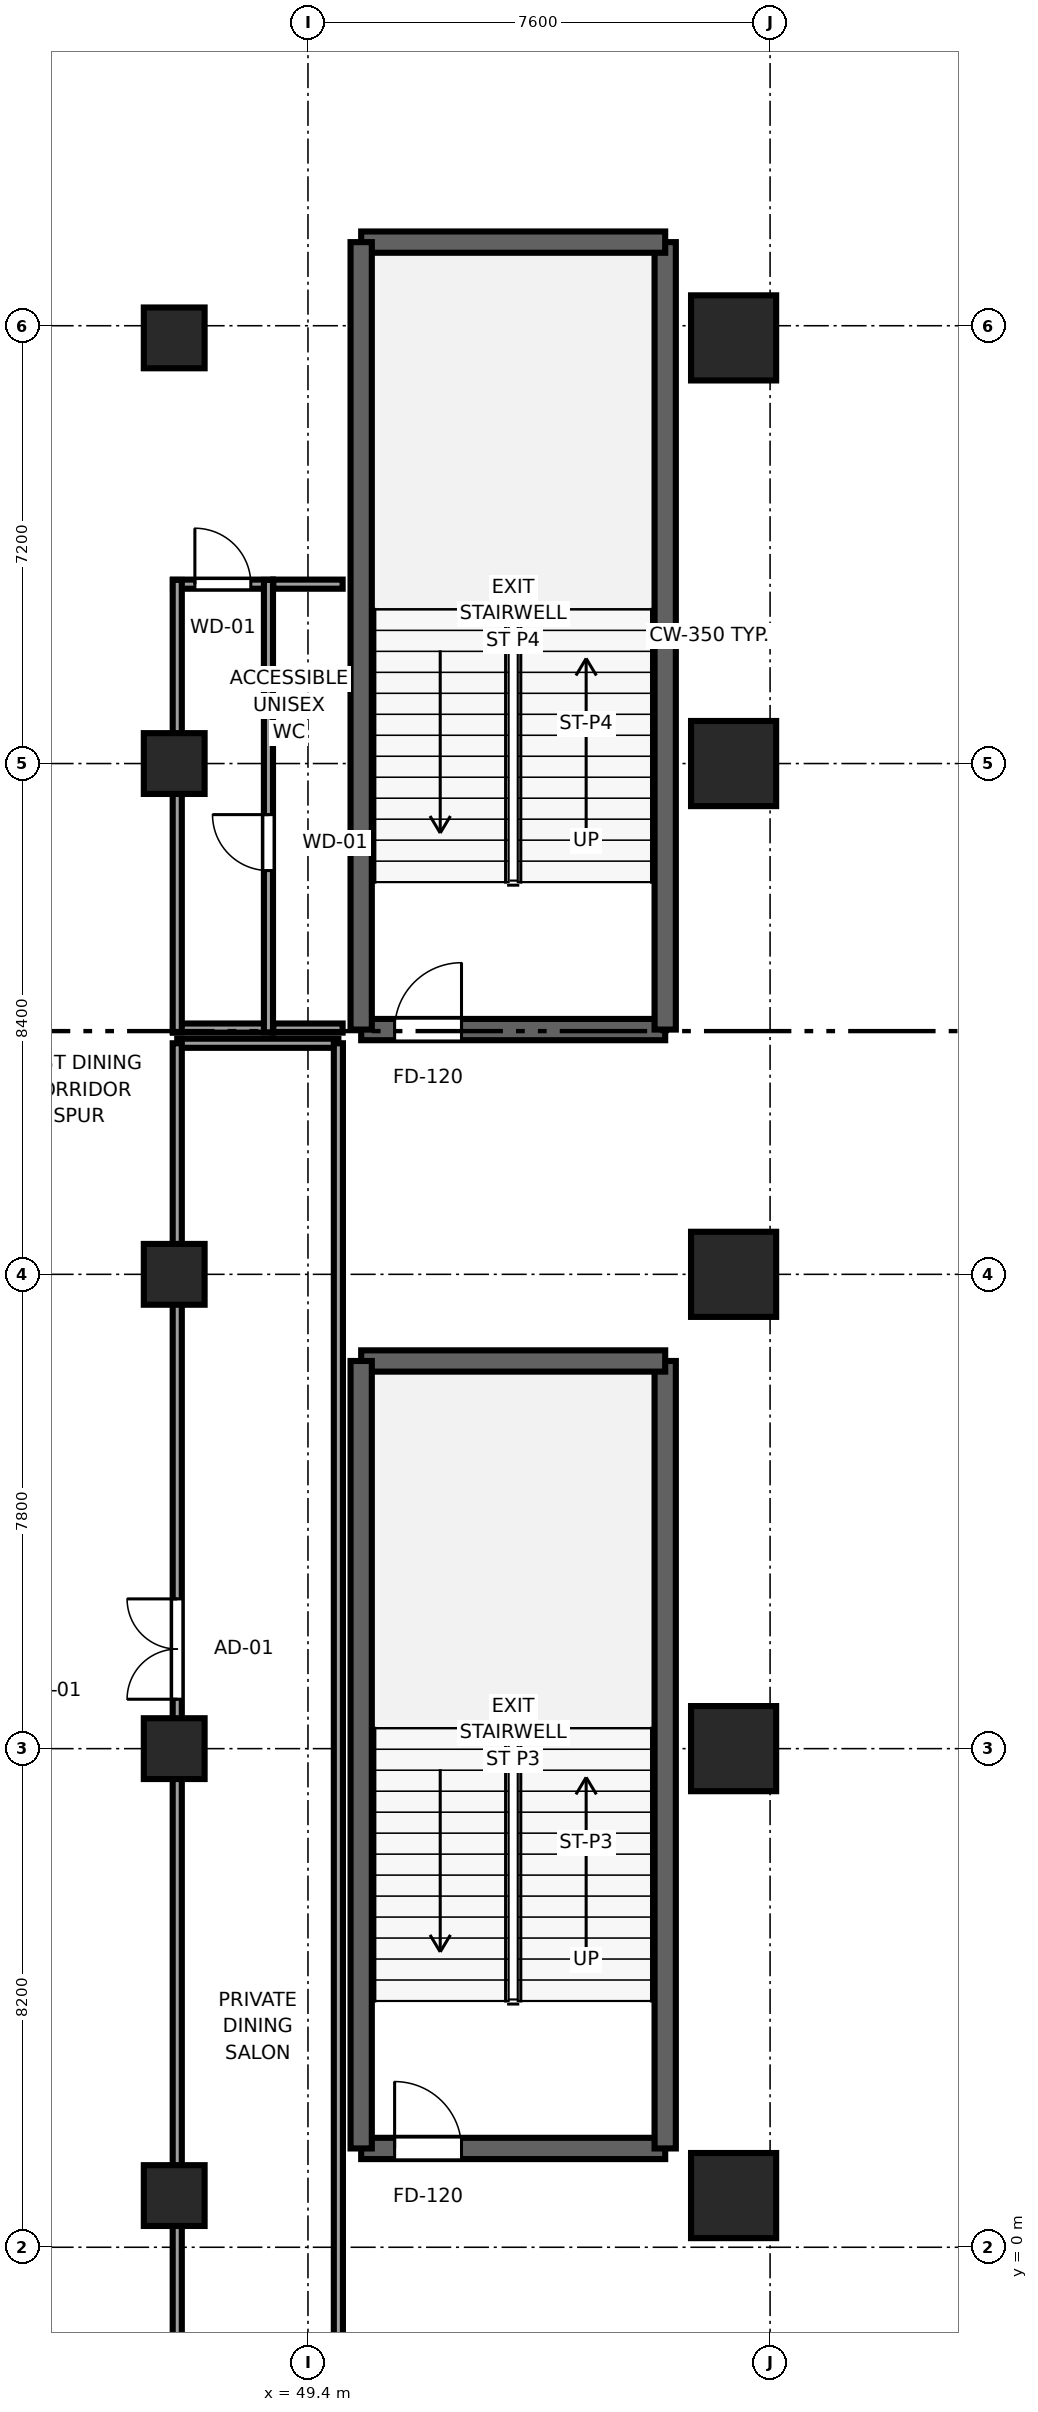
"""IFC4 building model, lengths in metres.
Left out: names, types, materials, properties, quantities, classifications, styles, units other than length and angle.
Written with IfcOpenShell. Run it as: python <this file> out.ifc"""

import sys

from ifc_helpers import new_model, si_unit, direction, frame, frame_2d, origin, origin_2d, place, context, subcontext, project, spatial, rectangle, extrude, source, transform, mapped, element, fill, save


model = new_model("IFC4")
c1 = context("Model", 3, precision=1e-05, world=origin(), true_north=direction((0.0, 1.0)))
c2 = subcontext(c1, "Body", "Model", "MODEL_VIEW")
j1 = project(units=[si_unit("LENGTHUNIT", "METRE"), si_unit("PLANEANGLEUNIT", "RADIAN")], contexts=[c1])
p1 = place(None, origin())
s1 = spatial("IfcSite", under=j1, at=p1, CompositionType="ELEMENT")
p2 = place(p1, origin())
s2 = spatial("IfcBuilding", under=s1, at=p2, CompositionType="ELEMENT")
p3 = place(p2, frame((0.0, 0.0, 6.0)))
s3 = spatial("IfcBuildingStorey", under=s2, at=p3, CompositionType="ELEMENT", Elevation=6.0)
p4 = place(p3, frame((50.275, 1.625, 0.0), z_axis=(0.0, 0.0, 1.0), x_axis=(1.0, 0.0, 0.0)))
e1 = element("IfcWall", 1, at=p4, inside=s3, PredefinedType="SHEAR", context=c2, shape_type="SweptSolid", body=[
    extrude(rectangle(XDim=5.0, YDim=0.35, at=frame_2d((2.5, 0.0))), origin(), (0.0, 0.0, 1.0), 5.0),
])
p5 = place(p4, frame((0.55, 0.0, 0.0)))
e2 = element("IfcOpeningElement", 2, at=p5, cuts=e1, PredefinedType="OPENING", context=c2, shape_type="SweptSolid", body=[
    extrude(rectangle(XDim=1.1, YDim=2.12, at=frame_2d((0.55, 1.06))), frame((0.0, 0.185, 0.0), z_axis=(0.0, -1.0, 0.0), x_axis=(1.0, 0.0, 0.0)), (0.0, 0.0, 1.0), 0.37),
])
p6 = place(p3, frame((55.275, 1.625, 0.0), z_axis=(0.0, 0.0, 1.0), x_axis=(0.0, 1.0, 0.0)))
e3 = element("IfcWall", 3, at=p6, inside=s3, PredefinedType="SHEAR", context=c2, shape_type="SweptSolid", body=[
    extrude(rectangle(XDim=12.95, YDim=0.35, at=frame_2d((6.475, 0.0))), origin(), (0.0, 0.0, 1.0), 5.0),
])
p7 = place(p3, frame((55.275, 14.575, 0.0), z_axis=(0.0, 0.0, 1.0), x_axis=(-1.0, 0.0, 0.0)))
e4 = element("IfcWall", 4, at=p7, inside=s3, PredefinedType="SHEAR", context=c2, shape_type="SweptSolid", body=[
    extrude(rectangle(XDim=5.0, YDim=0.35, at=frame_2d((2.5, 0.0))), origin(), (0.0, 0.0, 1.0), 5.0),
])
p8 = place(p3, frame((50.275, 14.575, 0.0), z_axis=(0.0, 0.0, 1.0), x_axis=(0.0, -1.0, 0.0)))
e5 = element("IfcWall", 5, at=p8, inside=s3, PredefinedType="SHEAR", context=c2, shape_type="SweptSolid", body=[
    extrude(rectangle(XDim=12.95, YDim=0.35, at=frame_2d((6.475, 0.0))), origin(), (0.0, 0.0, 1.0), 5.0),
])
p9 = place(p3, frame((50.275, 20.025, 0.0), z_axis=(0.0, 0.0, 1.0), x_axis=(1.0, 0.0, 0.0)))
e6 = element("IfcWall", 6, at=p9, inside=s3, PredefinedType="SHEAR", context=c2, shape_type="SweptSolid", body=[
    extrude(rectangle(XDim=5.0, YDim=0.35, at=frame_2d((2.5, 0.0))), origin(), (0.0, 0.0, 1.0), 5.0),
])
p10 = place(p9, frame((0.55, 0.0, 0.0)))
e7 = element("IfcOpeningElement", 7, at=p10, cuts=e6, PredefinedType="OPENING", context=c2, shape_type="SweptSolid", body=[
    extrude(rectangle(XDim=1.1, YDim=2.12, at=frame_2d((0.55, 1.06))), frame((0.0, 0.185, 0.0), z_axis=(0.0, -1.0, 0.0), x_axis=(1.0, 0.0, 0.0)), (0.0, 0.0, 1.0), 0.37),
])
p11 = place(p3, frame((55.275, 20.025, 0.0), z_axis=(0.0, 0.0, 1.0), x_axis=(0.0, 1.0, 0.0)))
e8 = element("IfcWall", 8, at=p11, inside=s3, PredefinedType="SHEAR", context=c2, shape_type="SweptSolid", body=[
    extrude(rectangle(XDim=12.95, YDim=0.35, at=frame_2d((6.475, 0.0))), origin(), (0.0, 0.0, 1.0), 5.0),
])
p12 = place(p3, frame((55.275, 32.975, 0.0), z_axis=(0.0, 0.0, 1.0), x_axis=(-1.0, 0.0, 0.0)))
e9 = element("IfcWall", 9, at=p12, inside=s3, PredefinedType="SHEAR", context=c2, shape_type="SweptSolid", body=[
    extrude(rectangle(XDim=5.0, YDim=0.35, at=frame_2d((2.5, 0.0))), origin(), (0.0, 0.0, 1.0), 5.0),
])
p13 = place(p3, frame((50.275, 32.975, 0.0), z_axis=(0.0, 0.0, 1.0), x_axis=(0.0, -1.0, 0.0)))
e10 = element("IfcWall", 10, at=p13, inside=s3, PredefinedType="SHEAR", context=c2, shape_type="SweptSolid", body=[
    extrude(rectangle(XDim=12.95, YDim=0.35, at=frame_2d((6.475, 0.0))), origin(), (0.0, 0.0, 1.0), 5.0),
])
m1 = source(origin(), c2, "Body", "SweptSolid", [
    extrude(rectangle(XDim=1.0, YDim=1.0, at=origin_2d()), origin(), (0.0, 0.0, 1.0), 5.0),
])
p14 = place(p3, frame((47.2, 0.85, 0.0), z_axis=(0.0, 0.0, 1.0), x_axis=(1.0, 0.0, 0.0)))
e11 = element("IfcColumn", 11, at=p14, inside=s3, PredefinedType="COLUMN", context=c2, shape_type="MappedRepresentation", body=[
    mapped(m1, transform((0.0, 0.0, 0.0), x_axis=(1.0, 0.0, 0.0), y_axis=(0.0, 1.0, 0.0), z_axis=(0.0, 0.0, 1.0), scale=1.0)),
])
m2 = source(origin(), c2, "Body", "SweptSolid", [
    extrude(rectangle(XDim=1.4, YDim=1.4, at=origin_2d()), origin(), (0.0, 0.0, 1.0), 5.0),
])
p15 = place(p3, frame((56.4, 0.85, 0.0), z_axis=(0.0, 0.0, 1.0), x_axis=(1.0, 0.0, 0.0)))
e12 = element("IfcColumn", 12, at=p15, inside=s3, PredefinedType="COLUMN", context=c2, shape_type="MappedRepresentation", body=[
    mapped(m2, transform((0.0, 0.0, 0.0), x_axis=(1.0, 0.0, 0.0), y_axis=(0.0, 1.0, 0.0), z_axis=(0.0, 0.0, 1.0), scale=1.0)),
])
p16 = place(p3, frame((47.2, 8.2, 0.0), z_axis=(0.0, 0.0, 1.0), x_axis=(1.0, 0.0, 0.0)))
e13 = element("IfcColumn", 13, at=p16, inside=s3, PredefinedType="COLUMN", context=c2, shape_type="MappedRepresentation", body=[
    mapped(m1, transform((0.0, 0.0, 0.0), x_axis=(1.0, 0.0, 0.0), y_axis=(0.0, 1.0, 0.0), z_axis=(0.0, 0.0, 1.0), scale=1.0)),
])
p17 = place(p3, frame((56.4, 8.2, 0.0), z_axis=(0.0, 0.0, 1.0), x_axis=(1.0, 0.0, 0.0)))
e14 = element("IfcColumn", 14, at=p17, inside=s3, PredefinedType="COLUMN", context=c2, shape_type="MappedRepresentation", body=[
    mapped(m2, transform((0.0, 0.0, 0.0), x_axis=(1.0, 0.0, 0.0), y_axis=(0.0, 1.0, 0.0), z_axis=(0.0, 0.0, 1.0), scale=1.0)),
])
p18 = place(p3, frame((47.2, 16.0, 0.0), z_axis=(0.0, 0.0, 1.0), x_axis=(1.0, 0.0, 0.0)))
e15 = element("IfcColumn", 15, at=p18, inside=s3, PredefinedType="COLUMN", context=c2, shape_type="MappedRepresentation", body=[
    mapped(m1, transform((0.0, 0.0, 0.0), x_axis=(1.0, 0.0, 0.0), y_axis=(0.0, 1.0, 0.0), z_axis=(0.0, 0.0, 1.0), scale=1.0)),
])
p19 = place(p3, frame((56.4, 16.0, 0.0), z_axis=(0.0, 0.0, 1.0), x_axis=(1.0, 0.0, 0.0)))
e16 = element("IfcColumn", 16, at=p19, inside=s3, PredefinedType="COLUMN", context=c2, shape_type="MappedRepresentation", body=[
    mapped(m2, transform((0.0, 0.0, 0.0), x_axis=(1.0, 0.0, 0.0), y_axis=(0.0, 1.0, 0.0), z_axis=(0.0, 0.0, 1.0), scale=1.0)),
])
p20 = place(p3, frame((47.2, 24.4, 0.0), z_axis=(0.0, 0.0, 1.0), x_axis=(1.0, 0.0, 0.0)))
e17 = element("IfcColumn", 17, at=p20, inside=s3, PredefinedType="COLUMN", context=c2, shape_type="MappedRepresentation", body=[
    mapped(m1, transform((0.0, 0.0, 0.0), x_axis=(1.0, 0.0, 0.0), y_axis=(0.0, 1.0, 0.0), z_axis=(0.0, 0.0, 1.0), scale=1.0)),
])
p21 = place(p3, frame((56.4, 24.4, 0.0), z_axis=(0.0, 0.0, 1.0), x_axis=(1.0, 0.0, 0.0)))
e18 = element("IfcColumn", 18, at=p21, inside=s3, PredefinedType="COLUMN", context=c2, shape_type="MappedRepresentation", body=[
    mapped(m2, transform((0.0, 0.0, 0.0), x_axis=(1.0, 0.0, 0.0), y_axis=(0.0, 1.0, 0.0), z_axis=(0.0, 0.0, 1.0), scale=1.0)),
])
p22 = place(p3, frame((47.2, 31.4, 0.0), z_axis=(0.0, 0.0, 1.0), x_axis=(1.0, 0.0, 0.0)))
e19 = element("IfcColumn", 19, at=p22, inside=s3, PredefinedType="COLUMN", context=c2, shape_type="MappedRepresentation", body=[
    mapped(m1, transform((0.0, 0.0, 0.0), x_axis=(1.0, 0.0, 0.0), y_axis=(0.0, 1.0, 0.0), z_axis=(0.0, 0.0, 1.0), scale=1.0)),
])
p23 = place(p3, frame((56.4, 31.4, 0.0), z_axis=(0.0, 0.0, 1.0), x_axis=(1.0, 0.0, 0.0)))
e20 = element("IfcColumn", 20, at=p23, inside=s3, PredefinedType="COLUMN", context=c2, shape_type="MappedRepresentation", body=[
    mapped(m2, transform((0.0, 0.0, 0.0), x_axis=(1.0, 0.0, 0.0), y_axis=(0.0, 1.0, 0.0), z_axis=(0.0, 0.0, 1.0), scale=1.0)),
])
p24 = place(p3, frame((47.25, 19.8, 0.0), z_axis=(0.0, 0.0, 1.0), x_axis=(1.0, 0.0, 0.0)))
e21 = element("IfcWall", 21, at=p24, inside=s3, PredefinedType="PARTITIONING", context=c2, shape_type="SweptSolid", body=[
    extrude(rectangle(XDim=2.65, YDim=0.15, at=frame_2d((1.325, 0.0))), origin(), (0.0, 0.0, 1.0), 4.74),
])
p25 = place(p3, frame((47.25, -2.025, 0.0), z_axis=(0.0, 0.0, 1.0), x_axis=(0.0, 1.0, 0.0)))
e22 = element("IfcWall", 22, at=p25, inside=s3, PredefinedType="PARTITIONING", context=c2, shape_type="SweptSolid", body=[
    extrude(rectangle(XDim=21.825, YDim=0.15, at=frame_2d((10.913, 0.0))), origin(), (0.0, 0.0, 1.0), 3.914),
])
p26 = place(p25, frame((11.038, 0.0, 0.0)))
e23 = element("IfcOpeningElement", 23, at=p26, cuts=e22, PredefinedType="OPENING", context=c2, shape_type="SweptSolid", body=[
    extrude(rectangle(XDim=1.65, YDim=2.15, at=frame_2d((0.825, 1.075))), frame((0.0, 0.085, 0.0), z_axis=(0.0, -1.0, 0.0), x_axis=(1.0, 0.0, 0.0)), (0.0, 0.0, 1.0), 0.17),
])
p27 = place(p3, frame((49.9, -2.025, 0.0), z_axis=(0.0, 0.0, 1.0), x_axis=(0.0, 1.0, 0.0)))
e24 = element("IfcWall", 24, at=p27, inside=s3, PredefinedType="PARTITIONING", context=c2, shape_type="SweptSolid", body=[
    extrude(rectangle(XDim=21.825, YDim=0.15, at=frame_2d((10.913, 0.0))), origin(), (0.0, 0.0, 1.0), 4.74),
])
p28 = place(p3, frame((47.18, 20.05, 0.0), z_axis=(0.0, 0.0, 1.0), x_axis=(1.0, 0.0, 0.0)))
e25 = element("IfcWall", 25, at=p28, inside=s3, PredefinedType="PARTITIONING", context=c2, shape_type="SweptSolid", body=[
    extrude(rectangle(XDim=1.64, YDim=0.15, at=frame_2d((0.82, 0.0))), origin(), (0.0, 0.0, 1.0), 4.74),
])
p29 = place(p3, frame((47.18, 27.35, 0.0), z_axis=(0.0, 0.0, 1.0), x_axis=(1.0, 0.0, 0.0)))
e26 = element("IfcWall", 26, at=p29, inside=s3, PredefinedType="PARTITIONING", context=c2, shape_type="SweptSolid", body=[
    extrude(rectangle(XDim=1.64, YDim=0.15, at=frame_2d((0.82, 0.0))), origin(), (0.0, 0.0, 1.0), 4.74),
])
p30 = place(p29, frame((0.36, 0.0, 0.0)))
e27 = element("IfcOpeningElement", 27, at=p30, cuts=e26, PredefinedType="OPENING", context=c2, shape_type="SweptSolid", body=[
    extrude(rectangle(XDim=0.92, YDim=2.01, at=frame_2d((0.46, 1.005))), frame((0.0, 0.085, 0.0), z_axis=(0.0, -1.0, 0.0), x_axis=(1.0, 0.0, 0.0)), (0.0, 0.0, 1.0), 0.17),
])
p31 = place(p3, frame((47.25, 19.98, 0.0), z_axis=(0.0, 0.0, 1.0), x_axis=(0.0, 1.0, 0.0)))
e28 = element("IfcWall", 28, at=p31, inside=s3, PredefinedType="PARTITIONING", context=c2, shape_type="SweptSolid", body=[
    extrude(rectangle(XDim=7.44, YDim=0.15, at=frame_2d((3.72, 0.0))), origin(), (0.0, 0.0, 1.0), 3.914),
])
p32 = place(p3, frame((48.75, 19.98, 0.0), z_axis=(0.0, 0.0, 1.0), x_axis=(0.0, 1.0, 0.0)))
e29 = element("IfcWall", 29, at=p32, inside=s3, PredefinedType="PARTITIONING", context=c2, shape_type="SweptSolid", body=[
    extrude(rectangle(XDim=7.44, YDim=0.15, at=frame_2d((3.72, 0.0))), origin(), (0.0, 0.0, 1.0), 4.74),
])
p33 = place(p32, frame((2.66, 0.0, 0.0)))
e30 = element("IfcOpeningElement", 30, at=p33, cuts=e29, PredefinedType="OPENING", context=c2, shape_type="SweptSolid", body=[
    extrude(rectangle(XDim=0.92, YDim=2.01, at=frame_2d((0.46, 1.005))), frame((0.0, 0.085, 0.0), z_axis=(0.0, -1.0, 0.0), x_axis=(1.0, 0.0, 0.0)), (0.0, 0.0, 1.0), 0.17),
])
for number, where, z_axis, x_axis in (
    (31, (48.83, 20.05, 0.0), (0.0, 0.0, 1.0), (1.0, 0.0, 0.0)),
    (32, (48.83, 27.35, 0.0), (0.0, 0.0, 1.0), (1.0, 0.0, 0.0)),
):
    element("IfcWall", number, at=place(p3, frame(where, z_axis=z_axis, x_axis=x_axis)), inside=s3, PredefinedType="PARTITIONING", context=c2, shape_type="SweptSolid", body=[
        extrude(rectangle(XDim=1.14, YDim=0.15, at=frame_2d((0.57, 0.0))), origin(), (0.0, 0.0, 1.0), 4.74),
    ])
m3 = source(origin(), c2, "Body", "SweptSolid", [
    extrude(rectangle(XDim=1.1, YDim=2.12, at=frame_2d((0.55, 1.06))), frame((0.0, 0.025, 0.0), z_axis=(0.0, -1.0, 0.0), x_axis=(1.0, 0.0, 0.0)), (0.0, 0.0, 1.0), 0.05),
])
p34 = place(p5, origin())
e33 = element("IfcDoor", 33, at=p34, inside=s3, OperationType="SINGLE_SWING_LEFT", PredefinedType="DOOR", context=c2, shape_type="MappedRepresentation", body=[
    mapped(m3, transform((0.0, 0.0, 0.0), x_axis=(1.0, 0.0, 0.0), y_axis=(0.0, 1.0, 0.0), z_axis=(0.0, 0.0, 1.0), scale=1.0)),
])
fill(e2, e33)
p35 = place(p10, origin())
e34 = element("IfcDoor", 34, at=p35, inside=s3, OperationType="SINGLE_SWING_RIGHT", PredefinedType="DOOR", context=c2, shape_type="MappedRepresentation", body=[
    mapped(m3, transform((0.0, 0.0, 0.0), x_axis=(1.0, 0.0, 0.0), y_axis=(0.0, 1.0, 0.0), z_axis=(0.0, 0.0, 1.0), scale=1.0)),
])
fill(e7, e34)
m4 = source(origin(), c2, "Body", "SweptSolid", [
    extrude(rectangle(XDim=1.65, YDim=2.15, at=frame_2d((0.825, 1.075))), frame((0.0, 0.025, 0.0), z_axis=(0.0, -1.0, 0.0), x_axis=(1.0, 0.0, 0.0)), (0.0, 0.0, 1.0), 0.05),
])
p36 = place(p26, origin())
e35 = element("IfcDoor", 35, at=p36, inside=s3, OperationType="DOUBLE_DOOR_SINGLE_SWING", PredefinedType="DOOR", context=c2, shape_type="MappedRepresentation", body=[
    mapped(m4, transform((0.0, 0.0, 0.0), x_axis=(1.0, 0.0, 0.0), y_axis=(0.0, 1.0, 0.0), z_axis=(0.0, 0.0, 1.0), scale=1.0)),
])
fill(e23, e35)
m5 = source(origin(), c2, "Body", "SweptSolid", [
    extrude(rectangle(XDim=0.92, YDim=2.01, at=frame_2d((0.46, 1.005))), frame((0.0, 0.025, 0.0), z_axis=(0.0, -1.0, 0.0), x_axis=(1.0, 0.0, 0.0)), (0.0, 0.0, 1.0), 0.05),
])
p37 = place(p30, origin())
e36 = element("IfcDoor", 36, at=p37, inside=s3, OperationType="SINGLE_SWING_LEFT", PredefinedType="DOOR", context=c2, shape_type="MappedRepresentation", body=[
    mapped(m5, transform((0.0, 0.0, 0.0), x_axis=(1.0, 0.0, 0.0), y_axis=(0.0, 1.0, 0.0), z_axis=(0.0, 0.0, 1.0), scale=1.0)),
])
fill(e27, e36)
p38 = place(p33, origin())
e37 = element("IfcDoor", 37, at=p38, inside=s3, OperationType="SINGLE_SWING_RIGHT", PredefinedType="DOOR", context=c2, shape_type="MappedRepresentation", body=[
    mapped(m5, transform((0.0, 0.0, 0.0), x_axis=(1.0, 0.0, 0.0), y_axis=(0.0, 1.0, 0.0), z_axis=(0.0, 0.0, 1.0), scale=1.0)),
])
fill(e30, e37)
save(model, sys.argv[1])
